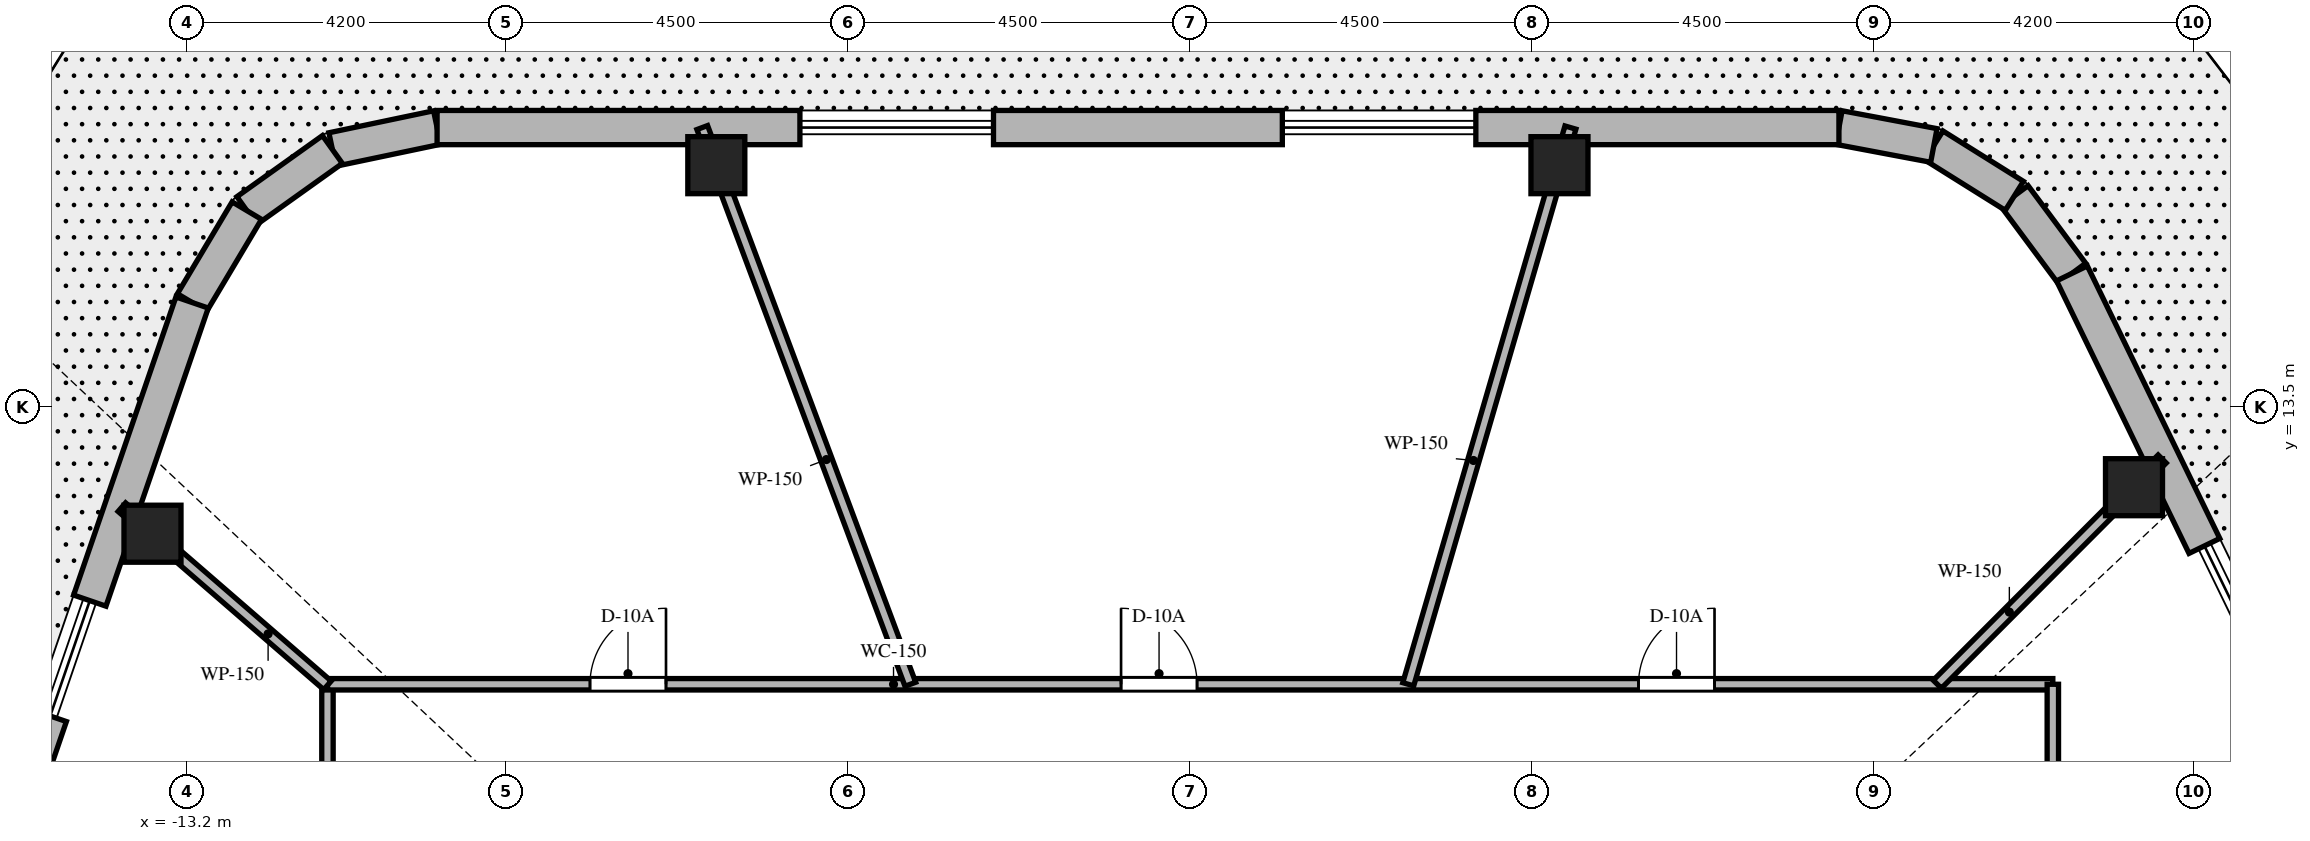
"""IFC4 building model, lengths in metres.
Left out: names, types, materials, properties, quantities, classifications, styles, units other than length and angle.
Written with IfcOpenShell. Run it as: python <this file> out.ifc"""

import sys

from ifc_helpers import new_model, si_unit, direction, frame, frame_2d, origin, origin_2d, place, context, subcontext, project, spatial, rectangle, extrude, element, fill, save


model = new_model("IFC4")
c1 = context("Model", 3, precision=1e-05, world=origin(), true_north=direction((0.0, 1.0)))
c2 = subcontext(c1, "Body", "Model", "MODEL_VIEW")
j1 = project(units=[si_unit("LENGTHUNIT", "METRE"), si_unit("PLANEANGLEUNIT", "RADIAN")], contexts=[c1])
p1 = place(None, origin())
s1 = spatial("IfcSite", under=j1, at=p1, CompositionType="ELEMENT")
p2 = place(p1, origin())
s2 = spatial("IfcBuilding", under=s1, at=p2, CompositionType="ELEMENT")
p3 = place(p2, frame((0.0, 0.0, 305.4)))
s3 = spatial("IfcBuildingStorey", under=s2, at=p3, CompositionType="ELEMENT", Elevation=305.4)
for number, where, z_axis, x_axis in (
    (1, (12.418, 12.443, 0.0), (0.0, 0.0, 1.0), (1.0, 0.0, 0.0)),
    (2, (4.859, 16.68, 0.0), (0.0, 0.0, 1.0), (1.0, 0.0, 0.0)),
    (3, (-6.234, 16.68, 0.0), (0.0, 0.0, 1.0), (1.0, 0.0, 0.0)),
    (4, (-13.652, 11.831, 0.0), (0.0, 0.0, 1.0), (1.0, 0.0, 0.0)),
):
    element("IfcColumn", number, at=place(p3, frame(where, z_axis=z_axis, x_axis=x_axis)), inside=s3, PredefinedType="COLUMN", context=c2, shape_type="SweptSolid", body=[
        extrude(rectangle(XDim=0.75, YDim=0.75, at=origin_2d()), origin(), (0.0, 0.0, 1.0), 5.0),
    ])
p4 = place(p3, frame((11.602, 15.256, 0.0), z_axis=(0.0, 0.0, 1.0), x_axis=(-0.596058719353, 0.802940846566, 0.0)))
e5 = element("IfcWall", 5, at=p4, inside=s3, PredefinedType="SOLIDWALL", context=c2, shape_type="SweptSolid", body=[
    extrude(rectangle(XDim=1.271, YDim=0.45, at=frame_2d((0.635, 0.0))), origin(), (0.0, 0.0, 1.0), 4.68),
])
p5 = place(p3, frame((10.844, 16.277, 0.0), z_axis=(0.0, 0.0, 1.0), x_axis=(-0.847723789959, 0.530437909597, 0.0)))
e6 = element("IfcWall", 6, at=p5, inside=s3, PredefinedType="SOLIDWALL", context=c2, shape_type="SweptSolid", body=[
    extrude(rectangle(XDim=1.25, YDim=0.45, at=frame_2d((0.625, 0.0))), origin(), (0.0, 0.0, 1.0), 4.68),
])
p6 = place(p3, frame((9.785, 16.939, 0.0), z_axis=(0.0, 0.0, 1.0), x_axis=(-0.982664955661, 0.185390358204, 0.0)))
e7 = element("IfcWall", 7, at=p6, inside=s3, PredefinedType="SOLIDWALL", context=c2, shape_type="SweptSolid", body=[
    extrude(rectangle(XDim=1.271, YDim=0.45, at=frame_2d((0.635, 0.0))), origin(), (0.0, 0.0, 1.0), 4.68),
])
p7 = place(p3, frame((-9.908, 17.175, 0.0), z_axis=(0.0, 0.0, 1.0), x_axis=(-0.978709642506, -0.205249691027, 0.0)))
e8 = element("IfcWall", 8, at=p7, inside=s3, PredefinedType="SOLIDWALL", context=c2, shape_type="SweptSolid", body=[
    extrude(rectangle(XDim=1.407, YDim=0.45, at=frame_2d((0.704, 0.0))), origin(), (0.0, 0.0, 1.0), 4.68),
])
p8 = place(p3, frame((-11.285, 16.886, 0.0), z_axis=(0.0, 0.0, 1.0), x_axis=(-0.813840765051, -0.581087953017, 0.0)))
e9 = element("IfcWall", 9, at=p8, inside=s3, PredefinedType="SOLIDWALL", context=c2, shape_type="SweptSolid", body=[
    extrude(rectangle(XDim=1.384, YDim=0.45, at=frame_2d((0.692, 0.0))), origin(), (0.0, 0.0, 1.0), 4.68),
])
p9 = place(p3, frame((-12.411, 16.082, 0.0), z_axis=(0.0, 0.0, 1.0), x_axis=(-0.511788829014, -0.859111281789, 0.0)))
e10 = element("IfcWall", 10, at=p9, inside=s3, PredefinedType="SOLIDWALL", context=c2, shape_type="SweptSolid", body=[
    extrude(rectangle(XDim=1.407, YDim=0.45, at=frame_2d((0.704, 0.0))), origin(), (0.0, 0.0, 1.0), 4.68),
])
p10 = place(p3, frame((13.344, 11.67, 0.0), z_axis=(0.0, 0.0, 1.0), x_axis=(-0.437044105444, 0.899440075768, 0.0)))
e11 = element("IfcWall", 11, at=p10, inside=s3, PredefinedType="SOLIDWALL", context=c2, shape_type="SweptSolid", body=[
    extrude(rectangle(XDim=3.987, YDim=0.45, at=frame_2d((1.993, 0.0))), origin(), (0.0, 0.0, 1.0), 4.68),
])
p11 = place(p3, frame((8.536, 17.175, 0.0), z_axis=(0.0, 0.0, 1.0), x_axis=(-1.0, 0.0, 0.0)))
e12 = element("IfcWall", 12, at=p11, inside=s3, PredefinedType="SOLIDWALL", context=c2, shape_type="SweptSolid", body=[
    extrude(rectangle(XDim=4.777, YDim=0.45, at=frame_2d((2.389, 0.0))), origin(), (0.0, 0.0, 1.0), 4.68),
])
p12 = place(p3, frame((1.213, 17.175, 0.0), z_axis=(0.0, 0.0, 1.0), x_axis=(-1.0, 0.0, 0.0)))
e13 = element("IfcWall", 13, at=p12, inside=s3, PredefinedType="SOLIDWALL", context=c2, shape_type="SweptSolid", body=[
    extrude(rectangle(XDim=3.8, YDim=0.45, at=frame_2d((1.9, 0.0))), origin(), (0.0, 0.0, 1.0), 4.68),
])
p13 = place(p3, frame((-5.134, 17.175, 0.0), z_axis=(0.0, 0.0, 1.0), x_axis=(-1.0, 0.0, 0.0)))
e14 = element("IfcWall", 14, at=p13, inside=s3, PredefinedType="SOLIDWALL", context=c2, shape_type="SweptSolid", body=[
    extrude(rectangle(XDim=4.773, YDim=0.45, at=frame_2d((2.387, 0.0))), origin(), (0.0, 0.0, 1.0), 4.68),
])
p14 = place(p3, frame((-13.131, 14.873, 0.0), z_axis=(0.0, 0.0, 1.0), x_axis=(-0.324498911717, -0.945886069405, 0.0)))
e15 = element("IfcWall", 15, at=p14, inside=s3, PredefinedType="SOLIDWALL", context=c2, shape_type="SweptSolid", body=[
    extrude(rectangle(XDim=4.147, YDim=0.45, at=frame_2d((2.073, 0.0))), origin(), (0.0, 0.0, 1.0), 4.68),
])
p15 = place(p3, frame((-14.998, 9.433, 0.0), z_axis=(0.0, 0.0, 1.0), x_axis=(-0.324503351443, -0.945884546286, 0.0)))
e16 = element("IfcWall", 16, at=p15, inside=s3, PredefinedType="SOLIDWALL", context=c2, shape_type="SweptSolid", body=[
    extrude(rectangle(XDim=3.8, YDim=0.45, at=frame_2d((1.9, 0.0))), origin(), (0.0, 0.0, 1.0), 4.68),
])
p16 = place(p3, frame((-11.35, -9.85, 0.0), z_axis=(0.0, 0.0, 1.0), x_axis=(0.0, 1.0, 0.0)))
e17 = element("IfcWall", 17, at=p16, inside=s3, PredefinedType="PARTITIONING", context=c2, shape_type="SweptSolid", body=[
    extrude(rectangle(XDim=19.7, YDim=0.15, at=frame_2d((9.85, 0.0))), origin(), (0.0, 0.0, 1.0), 2.87),
])
p17 = place(p16, frame((15.219, 0.0, 0.0)))
e18 = element("IfcOpeningElement", 18, at=p17, cuts=e17, PredefinedType="OPENING", context=c2, shape_type="SweptSolid", body=[
    extrude(rectangle(XDim=1.0, YDim=2.03, at=frame_2d((0.5, 1.015))), frame((0.0, 0.085, 0.0), z_axis=(0.0, -1.0, 0.0), x_axis=(1.0, 0.0, 0.0)), (0.0, 0.0, 1.0), 0.17),
])
p18 = place(p16, frame((8.805, 0.0, 0.0)))
e19 = element("IfcOpeningElement", 19, at=p18, cuts=e17, PredefinedType="OPENING", context=c2, shape_type="SweptSolid", body=[
    extrude(rectangle(XDim=1.0, YDim=2.03, at=frame_2d((0.5, 1.015))), frame((0.0, 0.085, 0.0), z_axis=(0.0, -1.0, 0.0), x_axis=(1.0, 0.0, 0.0)), (0.0, 0.0, 1.0), 0.17),
])
p19 = place(p16, frame((2.938, 0.0, 0.0)))
e20 = element("IfcOpeningElement", 20, at=p19, cuts=e17, PredefinedType="OPENING", context=c2, shape_type="SweptSolid", body=[
    extrude(rectangle(XDim=1.0, YDim=2.03, at=frame_2d((0.5, 1.015))), frame((0.0, 0.085, 0.0), z_axis=(0.0, -1.0, 0.0), x_axis=(1.0, 0.0, 0.0)), (0.0, 0.0, 1.0), 0.17),
])
p20 = place(p3, frame((-11.35, 9.85, 0.0), z_axis=(0.0, 0.0, 1.0), x_axis=(1.0, 0.0, 0.0)))
e21 = element("IfcWall", 21, at=p20, inside=s3, PredefinedType="PARTITIONING", context=c2, shape_type="SweptSolid", body=[
    extrude(rectangle(XDim=22.7, YDim=0.15, at=frame_2d((11.35, 0.0))), origin(), (0.0, 0.0, 1.0), 2.87),
])
p21 = place(p20, frame((17.249, 0.0, 0.0)))
e22 = element("IfcOpeningElement", 22, at=p21, cuts=e21, PredefinedType="OPENING", context=c2, shape_type="SweptSolid", body=[
    extrude(rectangle(XDim=1.0, YDim=2.03, at=frame_2d((0.5, 1.015))), frame((0.0, 0.085, 0.0), z_axis=(0.0, -1.0, 0.0), x_axis=(1.0, 0.0, 0.0)), (0.0, 0.0, 1.0), 0.17),
])
p22 = place(p20, frame((10.441, 0.0, 0.0)))
e23 = element("IfcOpeningElement", 23, at=p22, cuts=e21, PredefinedType="OPENING", context=c2, shape_type="SweptSolid", body=[
    extrude(rectangle(XDim=1.0, YDim=2.03, at=frame_2d((0.5, 1.015))), frame((0.0, 0.085, 0.0), z_axis=(0.0, -1.0, 0.0), x_axis=(1.0, 0.0, 0.0)), (0.0, 0.0, 1.0), 0.17),
])
p23 = place(p20, frame((3.454, 0.0, 0.0)))
e24 = element("IfcOpeningElement", 24, at=p23, cuts=e21, PredefinedType="OPENING", context=c2, shape_type="SweptSolid", body=[
    extrude(rectangle(XDim=1.0, YDim=2.03, at=frame_2d((0.5, 1.015))), frame((0.0, 0.085, 0.0), z_axis=(0.0, -1.0, 0.0), x_axis=(1.0, 0.0, 0.0)), (0.0, 0.0, 1.0), 0.17),
])
p24 = place(p3, frame((11.35, 9.85, 0.0), z_axis=(0.0, 0.0, 1.0), x_axis=(0.0, -1.0, 0.0)))
e25 = element("IfcWall", 25, at=p24, inside=s3, PredefinedType="PARTITIONING", context=c2, shape_type="SweptSolid", body=[
    extrude(rectangle(XDim=19.7, YDim=0.15, at=frame_2d((9.85, 0.0))), origin(), (0.0, 0.0, 1.0), 2.87),
])
p25 = place(p24, frame((2.938, 0.0, 0.0)))
e26 = element("IfcOpeningElement", 26, at=p25, cuts=e25, PredefinedType="OPENING", context=c2, shape_type="SweptSolid", body=[
    extrude(rectangle(XDim=1.0, YDim=2.03, at=frame_2d((0.5, 1.015))), frame((0.0, 0.085, 0.0), z_axis=(0.0, -1.0, 0.0), x_axis=(1.0, 0.0, 0.0)), (0.0, 0.0, 1.0), 0.17),
])
p26 = place(p24, frame((15.219, 0.0, 0.0)))
e27 = element("IfcOpeningElement", 27, at=p26, cuts=e25, PredefinedType="OPENING", context=c2, shape_type="SweptSolid", body=[
    extrude(rectangle(XDim=1.0, YDim=2.03, at=frame_2d((0.5, 1.015))), frame((0.0, 0.085, 0.0), z_axis=(0.0, -1.0, 0.0), x_axis=(1.0, 0.0, 0.0)), (0.0, 0.0, 1.0), 0.17),
])
p27 = place(p24, frame((8.805, 0.0, 0.0)))
e28 = element("IfcOpeningElement", 28, at=p27, cuts=e25, PredefinedType="OPENING", context=c2, shape_type="SweptSolid", body=[
    extrude(rectangle(XDim=1.0, YDim=2.03, at=frame_2d((0.5, 1.015))), frame((0.0, 0.085, 0.0), z_axis=(0.0, -1.0, 0.0), x_axis=(1.0, 0.0, 0.0)), (0.0, 0.0, 1.0), 0.17),
])
p28 = place(p3, frame((9.83, 9.85, 0.0), z_axis=(0.0, 0.0, 1.0), x_axis=(0.706435999186, 0.707776927467, 0.0)))
e29 = element("IfcWall", 29, at=p28, inside=s3, PredefinedType="PARTITIONING", context=c2, shape_type="SweptSolid", body=[
    extrude(rectangle(XDim=4.188, YDim=0.15, at=frame_2d((2.094, 0.0))), origin(), (0.0, 0.0, 1.0), 2.87),
])
p29 = place(p3, frame((2.869, 9.85, 0.0), z_axis=(0.0, 0.0, 1.0), x_axis=(0.279679268414, 0.960093488583, 0.0)))
e30 = element("IfcWall", 30, at=p29, inside=s3, PredefinedType="PARTITIONING", context=c2, shape_type="SweptSolid", body=[
    extrude(rectangle(XDim=7.629, YDim=0.15, at=frame_2d((3.815, 0.0))), origin(), (0.0, 0.0, 1.0), 2.87),
])
p30 = place(p3, frame((-3.681, 9.85, 0.0), z_axis=(0.0, 0.0, 1.0), x_axis=(-0.350079676448, 0.936719926199, 0.0)))
e31 = element("IfcWall", 31, at=p30, inside=s3, PredefinedType="PARTITIONING", context=c2, shape_type="SweptSolid", body=[
    extrude(rectangle(XDim=7.82, YDim=0.15, at=frame_2d((3.91, 0.0))), origin(), (0.0, 0.0, 1.0), 2.87),
])
p31 = place(p3, frame((-11.35, 9.836, 0.0), z_axis=(0.0, 0.0, 1.0), x_axis=(-0.755716089778, 0.65489937521, 0.0)))
e32 = element("IfcWall", 32, at=p31, inside=s3, PredefinedType="PARTITIONING", context=c2, shape_type="SweptSolid", body=[
    extrude(rectangle(XDim=3.579, YDim=0.15, at=frame_2d((1.79, 0.0))), origin(), (0.0, 0.0, 1.0), 2.87),
])
p32 = place(p21, origin())
e33 = element("IfcDoor", 33, at=p32, inside=s3, OperationType="SINGLE_SWING_RIGHT", PredefinedType="DOOR", context=c2, shape_type="SweptSolid", body=[
    extrude(rectangle(XDim=1.0, YDim=2.03, at=frame_2d((0.5, 1.015))), frame((0.0, 0.025, 0.0), z_axis=(0.0, -1.0, 0.0), x_axis=(1.0, 0.0, 0.0)), (0.0, 0.0, 1.0), 0.05),
])
fill(e22, e33)
p33 = place(p22, origin())
e34 = element("IfcDoor", 34, at=p33, inside=s3, OperationType="SINGLE_SWING_LEFT", PredefinedType="DOOR", context=c2, shape_type="SweptSolid", body=[
    extrude(rectangle(XDim=1.0, YDim=2.03, at=frame_2d((0.5, 1.015))), frame((0.0, 0.025, 0.0), z_axis=(0.0, -1.0, 0.0), x_axis=(1.0, 0.0, 0.0)), (0.0, 0.0, 1.0), 0.05),
])
fill(e23, e34)
p34 = place(p23, origin())
e35 = element("IfcDoor", 35, at=p34, inside=s3, OperationType="SINGLE_SWING_RIGHT", PredefinedType="DOOR", context=c2, shape_type="SweptSolid", body=[
    extrude(rectangle(XDim=1.0, YDim=2.03, at=frame_2d((0.5, 1.015))), frame((0.0, 0.025, 0.0), z_axis=(0.0, -1.0, 0.0), x_axis=(1.0, 0.0, 0.0)), (0.0, 0.0, 1.0), 0.05),
])
fill(e24, e35)
save(model, sys.argv[1])
